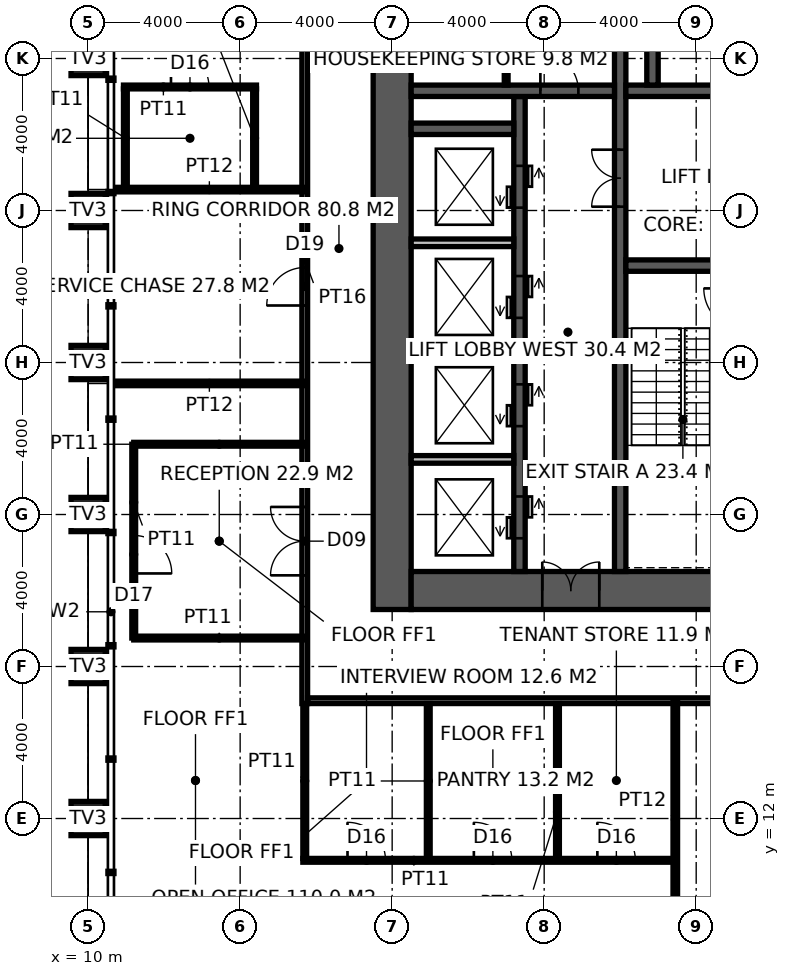
"""IFC4 building model, lengths in metres.
Left out: names, types, materials, properties, quantities, classifications, styles, units other than length and angle.
Written with IfcOpenShell. Run it as: python <this file> out.ifc"""

import sys

from ifc_helpers import new_model, si_unit, direction, frame, frame_2d, origin, origin_2d, place, context, subcontext, project, spatial, rectangle, hollow_rectangle, extrude, element, fill, save


model = new_model("IFC4")
c1 = context("Model", 3, precision=1e-05, world=origin(), true_north=direction((0.0, 1.0)))
c2 = subcontext(c1, "Body", "Model", "MODEL_VIEW")
j1 = project(units=[si_unit("LENGTHUNIT", "METRE"), si_unit("PLANEANGLEUNIT", "RADIAN")], contexts=[c1])
p1 = place(None, origin())
s1 = spatial("IfcSite", under=j1, at=p1, CompositionType="ELEMENT")
p2 = place(p1, origin())
s2 = spatial("IfcBuilding", under=s1, at=p2, CompositionType="ELEMENT")
p3 = place(p2, frame((0.0, 0.0, 238.2)))
s3 = spatial("IfcBuildingStorey", under=s2, at=p3, CompositionType="ELEMENT", Elevation=238.2)
for number, where, z_axis, x_axis in (
    (1, (10.0, 12.0, 0.0), (0.0, 0.0, 1.0), (1.0, 0.0, 0.0)),
    (2, (10.0, 16.0, 0.0), (0.0, 0.0, 1.0), (1.0, 0.0, 0.0)),
    (3, (10.0, 20.0, 0.0), (0.0, 0.0, 1.0), (1.0, 0.0, 0.0)),
    (4, (10.0, 24.0, 0.0), (0.0, 0.0, 1.0), (1.0, 0.0, 0.0)),
    (5, (10.0, 28.0, 0.0), (0.0, 0.0, 1.0), (1.0, 0.0, 0.0)),
    (6, (10.0, 32.0, 0.0), (0.0, 0.0, 1.0), (1.0, 0.0, 0.0)),
):
    element("IfcColumn", number, at=place(p3, frame(where, z_axis=z_axis, x_axis=x_axis)), inside=s3, PredefinedType="USERDEFINED", context=c2, shape_type="SweptSolid", body=[
        extrude(hollow_rectangle(XDim=0.9, YDim=0.9, WallThickness=0.08, at=origin_2d()), origin(), (0.0, 0.0, 1.0), 4.0),
    ])
p4 = place(p3, frame((18.0, 17.5, -0.15), z_axis=(0.0, 0.0, 1.0), x_axis=(0.0, 1.0, 0.0)))
e7 = element("IfcWall", 7, at=p4, inside=s3, PredefinedType="SHEAR", context=c2, shape_type="SweptSolid", body=[
    extrude(rectangle(XDim=19.0, YDim=1.0, at=frame_2d((9.5, 0.0))), origin(), (0.0, 0.0, 1.0), 4.0),
])
p5 = place(p3, frame((18.5, 18.0, -0.15), z_axis=(0.0, 0.0, 1.0), x_axis=(1.0, 0.0, 0.0)))
e8 = element("IfcWall", 8, at=p5, inside=s3, PredefinedType="SHEAR", context=c2, shape_type="SweptSolid", body=[
    extrude(rectangle(XDim=17.6, YDim=1.0, at=frame_2d((8.8, 0.0))), origin(), (0.0, 0.0, 1.0), 4.0),
])
p6 = place(p5, frame((3.45, 0.0, 0.15)))
e9 = element("IfcOpeningElement", 9, at=p6, cuts=e8, PredefinedType="OPENING", context=c2, shape_type="SweptSolid", body=[
    extrude(rectangle(XDim=1.5, YDim=2.4, at=frame_2d((0.75, 1.2))), frame((0.0, 0.51, 0.0), z_axis=(0.0, -1.0, 0.0), x_axis=(1.0, 0.0, 0.0)), (0.0, 0.0, 1.0), 1.02),
])
p7 = place(p3, frame((24.0, 18.5, -0.15), z_axis=(0.0, 0.0, 1.0), x_axis=(0.0, 1.0, 0.0)))
e10 = element("IfcWall", 10, at=p7, inside=s3, PredefinedType="SHEAR", context=c2, shape_type="SweptSolid", body=[
    extrude(rectangle(XDim=17.0, YDim=0.3, at=frame_2d((8.5, 0.0))), origin(), (0.0, 0.0, 1.0), 4.0),
])
p8 = place(p7, frame((9.6, 0.0, 0.15)))
e11 = element("IfcOpeningElement", 11, at=p8, cuts=e10, PredefinedType="OPENING", context=c2, shape_type="SweptSolid", body=[
    extrude(rectangle(XDim=1.5, YDim=2.4, at=frame_2d((0.75, 1.2))), frame((0.0, 0.16, 0.0), z_axis=(0.0, -1.0, 0.0), x_axis=(1.0, 0.0, 0.0)), (0.0, 0.0, 1.0), 0.32),
])
p9 = place(p3, frame((24.15, 26.55, -0.15), z_axis=(0.0, 0.0, 1.0), x_axis=(1.0, 0.0, 0.0)))
e12 = element("IfcWall", 12, at=p9, inside=s3, PredefinedType="SHEAR", context=c2, shape_type="SweptSolid", body=[
    extrude(rectangle(XDim=11.25, YDim=0.3, at=frame_2d((5.625, 0.0))), origin(), (0.0, 0.0, 1.0), 4.0),
])
p10 = place(p9, frame((9.2, 0.0, 0.15)))
e13 = element("IfcOpeningElement", 13, at=p10, cuts=e12, PredefinedType="OPENING", context=c2, shape_type="SweptSolid", body=[
    extrude(rectangle(XDim=1.1, YDim=2.2, at=frame_2d((0.55, 1.1))), frame((0.0, 0.16, 0.0), z_axis=(0.0, -1.0, 0.0), x_axis=(1.0, 0.0, 0.0)), (0.0, 0.0, 1.0), 0.32),
])
p11 = place(p9, frame((4.9, 0.0, 0.15)))
e14 = element("IfcOpeningElement", 14, at=p11, cuts=e12, PredefinedType="OPENING", context=c2, shape_type="SweptSolid", body=[
    extrude(rectangle(XDim=1.5, YDim=2.4, at=frame_2d((0.75, 1.2))), frame((0.0, 0.16, 0.0), z_axis=(0.0, -1.0, 0.0), x_axis=(1.0, 0.0, 0.0)), (0.0, 0.0, 1.0), 0.32),
])
p12 = place(p3, frame((24.15, 31.15, -0.15), z_axis=(0.0, 0.0, 1.0), x_axis=(1.0, 0.0, 0.0)))
e15 = element("IfcWall", 15, at=p12, inside=s3, PredefinedType="SHEAR", context=c2, shape_type="SweptSolid", body=[
    extrude(rectangle(XDim=11.25, YDim=0.3, at=frame_2d((5.625, 0.0))), origin(), (0.0, 0.0, 1.0), 4.0),
])
p13 = place(p12, frame((3.15, 0.0, 0.15)))
e16 = element("IfcOpeningElement", 16, at=p13, cuts=e15, PredefinedType="OPENING", context=c2, shape_type="SweptSolid", body=[
    extrude(rectangle(XDim=1.0, YDim=2.2, at=frame_2d((0.5, 1.1))), frame((0.0, 0.16, 0.0), z_axis=(0.0, -1.0, 0.0), x_axis=(1.0, 0.0, 0.0)), (0.0, 0.0, 1.0), 0.32),
])
p14 = place(p12, frame((7.25, 0.0, 0.15)))
e17 = element("IfcOpeningElement", 17, at=p14, cuts=e15, PredefinedType="OPENING", context=c2, shape_type="SweptSolid", body=[
    extrude(rectangle(XDim=1.4, YDim=2.4, at=frame_2d((0.7, 1.2))), frame((0.0, 0.16, 0.0), z_axis=(0.0, -1.0, 0.0), x_axis=(1.0, 0.0, 0.0)), (0.0, 0.0, 1.0), 0.32),
])
p15 = place(p3, frame((21.35, 18.5, -0.15), z_axis=(0.0, 0.0, 1.0), x_axis=(0.0, 1.0, 0.0)))
e18 = element("IfcWall", 18, at=p15, inside=s3, PredefinedType="SHEAR", context=c2, shape_type="SweptSolid", body=[
    extrude(rectangle(XDim=12.5, YDim=0.3, at=frame_2d((6.25, 0.0))), origin(), (0.0, 0.0, 1.0), 4.0),
])
p16 = place(p15, frame((0.875, 0.0, 0.15)))
e19 = element("IfcOpeningElement", 19, at=p16, cuts=e18, PredefinedType="OPENING", context=c2, shape_type="SweptSolid", body=[
    extrude(rectangle(XDim=1.1, YDim=2.2, at=frame_2d((0.55, 1.1))), frame((0.0, 0.16, 0.0), z_axis=(0.0, -1.0, 0.0), x_axis=(1.0, 0.0, 0.0)), (0.0, 0.0, 1.0), 0.32),
])
p17 = place(p15, frame((3.825, 0.0, 0.15)))
e20 = element("IfcOpeningElement", 20, at=p17, cuts=e18, PredefinedType="OPENING", context=c2, shape_type="SweptSolid", body=[
    extrude(rectangle(XDim=1.1, YDim=2.2, at=frame_2d((0.55, 1.1))), frame((0.0, 0.16, 0.0), z_axis=(0.0, -1.0, 0.0), x_axis=(1.0, 0.0, 0.0)), (0.0, 0.0, 1.0), 0.32),
])
p18 = place(p15, frame((6.675, 0.0, 0.15)))
e21 = element("IfcOpeningElement", 21, at=p18, cuts=e18, PredefinedType="OPENING", context=c2, shape_type="SweptSolid", body=[
    extrude(rectangle(XDim=1.1, YDim=2.2, at=frame_2d((0.55, 1.1))), frame((0.0, 0.16, 0.0), z_axis=(0.0, -1.0, 0.0), x_axis=(1.0, 0.0, 0.0)), (0.0, 0.0, 1.0), 0.32),
])
p19 = place(p15, frame((9.575, 0.0, 0.15)))
e22 = element("IfcOpeningElement", 22, at=p19, cuts=e18, PredefinedType="OPENING", context=c2, shape_type="SweptSolid", body=[
    extrude(rectangle(XDim=1.1, YDim=2.2, at=frame_2d((0.55, 1.1))), frame((0.0, 0.16, 0.0), z_axis=(0.0, -1.0, 0.0), x_axis=(1.0, 0.0, 0.0)), (0.0, 0.0, 1.0), 0.32),
])
p20 = place(p3, frame((18.5, 31.15, -0.15), z_axis=(0.0, 0.0, 1.0), x_axis=(1.0, 0.0, 0.0)))
e23 = element("IfcWall", 23, at=p20, inside=s3, PredefinedType="SHEAR", context=c2, shape_type="SweptSolid", body=[
    extrude(rectangle(XDim=5.35, YDim=0.3, at=frame_2d((2.675, 0.0))), origin(), (0.0, 0.0, 1.0), 4.0),
])
p21 = place(p20, frame((3.4, 0.0, 0.15)))
e24 = element("IfcOpeningElement", 24, at=p21, cuts=e23, PredefinedType="OPENING", context=c2, shape_type="SweptSolid", body=[
    extrude(rectangle(XDim=1.0, YDim=2.2, at=frame_2d((0.5, 1.1))), frame((0.0, 0.16, 0.0), z_axis=(0.0, -1.0, 0.0), x_axis=(1.0, 0.0, 0.0)), (0.0, 0.0, 1.0), 0.32),
])
p22 = place(p3, frame((18.5, 30.15, -0.15), z_axis=(0.0, 0.0, 1.0), x_axis=(1.0, 0.0, 0.0)))
e25 = element("IfcWall", 25, at=p22, inside=s3, PredefinedType="SHEAR", context=c2, shape_type="SweptSolid", body=[
    extrude(rectangle(XDim=2.7, YDim=0.3, at=frame_2d((1.35, 0.0))), origin(), (0.0, 0.0, 1.0), 4.0),
])
p23 = place(p3, frame((24.85, 31.3, -0.15), z_axis=(0.0, 0.0, 1.0), x_axis=(0.0, 1.0, 0.0)))
e26 = element("IfcWall", 26, at=p23, inside=s3, PredefinedType="SHEAR", context=c2, shape_type="SweptSolid", body=[
    extrude(rectangle(XDim=4.2, YDim=0.3, at=frame_2d((2.1, 0.0))), origin(), (0.0, 0.0, 1.0), 4.0),
])
for number, where, z_axis, x_axis in (
    (27, (18.5, 21.45, -0.15), (0.0, 0.0, 1.0), (1.0, 0.0, 0.0)),
    (28, (18.5, 24.3, -0.15), (0.0, 0.0, 1.0), (1.0, 0.0, 0.0)),
    (29, (18.5, 27.15, -0.15), (0.0, 0.0, 1.0), (1.0, 0.0, 0.0)),
):
    element("IfcWall", number, at=place(p3, frame(where, z_axis=z_axis, x_axis=x_axis)), inside=s3, PredefinedType="SOLIDWALL", context=c2, shape_type="SweptSolid", body=[
        extrude(rectangle(XDim=2.7, YDim=0.2, at=frame_2d((1.35, 0.0))), origin(), (0.0, 0.0, 1.0), 4.0),
    ])
p24 = place(p3, frame((21.0, 31.3, 0.0), z_axis=(0.0, 0.0, 1.0), x_axis=(0.0, 1.0, 0.0)))
e30 = element("IfcWall", 30, at=p24, inside=s3, PredefinedType="PARTITIONING", context=c2, shape_type="SweptSolid", body=[
    extrude(rectangle(XDim=4.2, YDim=0.1, at=frame_2d((2.1, 0.0))), origin(), (0.0, 0.0, 1.0), 3.85),
])
p25 = place(p24, frame((1.55, 0.0, 0.0)))
e31 = element("IfcOpeningElement", 31, at=p25, cuts=e30, PredefinedType="OPENING", context=c2, shape_type="SweptSolid", body=[
    extrude(rectangle(XDim=1.0, YDim=2.2, at=frame_2d((0.5, 1.1))), frame((0.0, 0.06, 0.0), z_axis=(0.0, -1.0, 0.0), x_axis=(1.0, 0.0, 0.0)), (0.0, 0.0, 1.0), 0.12),
])
p26 = place(p3, frame((15.7, 15.025, 0.0), z_axis=(0.0, 0.0, 1.0), x_axis=(0.0, 1.0, 0.0)))
e32 = element("IfcWall", 32, at=p26, inside=s3, PredefinedType="PARTITIONING", context=c2, shape_type="SweptSolid", body=[
    extrude(rectangle(XDim=23.35, YDim=0.15, at=frame_2d((11.675, 0.0))), origin(), (0.0, 0.0, 1.0), 3.85),
])
p27 = place(p26, frame((3.374, 0.0, 0.0)))
e33 = element("IfcOpeningElement", 33, at=p27, cuts=e32, PredefinedType="OPENING", context=c2, shape_type="SweptSolid", body=[
    extrude(rectangle(XDim=1.8, YDim=2.4, at=frame_2d((0.9, 1.2))), frame((0.0, 0.085, 0.0), z_axis=(0.0, -1.0, 0.0), x_axis=(1.0, 0.0, 0.0)), (0.0, 0.0, 1.0), 0.17),
])
p28 = place(p26, frame((17.476, 0.0, 0.0)))
e34 = element("IfcOpeningElement", 34, at=p28, cuts=e32, PredefinedType="OPENING", context=c2, shape_type="SweptSolid", body=[
    extrude(rectangle(XDim=1.8, YDim=2.4, at=frame_2d((0.9, 1.2))), frame((0.0, 0.085, 0.0), z_axis=(0.0, -1.0, 0.0), x_axis=(1.0, 0.0, 0.0)), (0.0, 0.0, 1.0), 0.17),
])
p29 = place(p26, frame((10.475, 0.0, 0.0)))
e35 = element("IfcOpeningElement", 35, at=p29, cuts=e32, PredefinedType="OPENING", context=c2, shape_type="SweptSolid", body=[
    extrude(rectangle(XDim=1.0, YDim=2.2, at=frame_2d((0.5, 1.1))), frame((0.0, 0.085, 0.0), z_axis=(0.0, -1.0, 0.0), x_axis=(1.0, 0.0, 0.0)), (0.0, 0.0, 1.0), 0.17),
])
p30 = place(p3, frame((15.775, 15.1, 0.0), z_axis=(0.0, 0.0, 1.0), x_axis=(1.0, 0.0, 0.0)))
e36 = element("IfcWall", 36, at=p30, inside=s3, PredefinedType="PARTITIONING", context=c2, shape_type="SweptSolid", body=[
    extrude(rectangle(XDim=22.65, YDim=0.15, at=frame_2d((11.325, 0.0))), origin(), (0.0, 0.0, 1.0), 3.85),
])
p31 = place(p30, frame((11.725, 0.0, 0.0)))
e37 = element("IfcOpeningElement", 37, at=p31, cuts=e36, PredefinedType="OPENING", context=c2, shape_type="SweptSolid", body=[
    extrude(rectangle(XDim=1.0, YDim=2.2, at=frame_2d((0.5, 1.1))), frame((0.0, 0.085, 0.0), z_axis=(0.0, -1.0, 0.0), x_axis=(1.0, 0.0, 0.0)), (0.0, 0.0, 1.0), 0.17),
])
p32 = place(p3, frame((25.45, 4.68, 0.0), z_axis=(0.0, 0.0, 1.0), x_axis=(0.0, 1.0, 0.0)))
e38 = element("IfcWall", 38, at=p32, inside=s3, PredefinedType="PARTITIONING", context=c2, shape_type="SweptSolid", body=[
    extrude(rectangle(XDim=10.42, YDim=0.12, at=frame_2d((5.21, 0.0))), origin(), (0.0, 0.0, 1.0), 3.85),
])
for number, where, z_axis, x_axis in (
    (39, (10.68, 23.45, 0.0), (0.0, 0.0, 1.0), (1.0, 0.0, 0.0)),
    (40, (10.68, 28.55, 0.0), (0.0, 0.0, 1.0), (1.0, 0.0, 0.0)),
):
    element("IfcWall", number, at=place(p3, frame(where, z_axis=z_axis, x_axis=x_axis)), inside=s3, PredefinedType="PARTITIONING", context=c2, shape_type="SweptSolid", body=[
        extrude(rectangle(XDim=5.02, YDim=0.12, at=frame_2d((2.51, 0.0))), origin(), (0.0, 0.0, 1.0), 2.65),
    ])
p33 = place(p3, frame((15.65, 10.9, 0.0), z_axis=(0.0, 0.0, 1.0), x_axis=(1.0, 0.0, 0.0)))
e41 = element("IfcWall", 41, at=p33, inside=s3, PredefinedType="PARTITIONING", context=c2, shape_type="SweptSolid", body=[
    extrude(rectangle(XDim=9.739, YDim=0.1, at=frame_2d((4.87, 0.0))), origin(), (0.0, 0.0, 1.0), 3.85),
])
p34 = place(p33, frame((1.175, 0.0, 0.0)))
e42 = element("IfcOpeningElement", 42, at=p34, cuts=e41, PredefinedType="OPENING", context=c2, shape_type="SweptSolid", body=[
    extrude(rectangle(XDim=1.0, YDim=2.2, at=frame_2d((0.5, 1.1))), frame((0.0, 0.06, 0.0), z_axis=(0.0, -1.0, 0.0), x_axis=(1.0, 0.0, 0.0)), (0.0, 0.0, 1.0), 0.12),
])
p35 = place(p33, frame((4.5, 0.0, 0.0)))
e43 = element("IfcOpeningElement", 43, at=p35, cuts=e41, PredefinedType="OPENING", context=c2, shape_type="SweptSolid", body=[
    extrude(rectangle(XDim=1.0, YDim=2.2, at=frame_2d((0.5, 1.1))), frame((0.0, 0.06, 0.0), z_axis=(0.0, -1.0, 0.0), x_axis=(1.0, 0.0, 0.0)), (0.0, 0.0, 1.0), 0.12),
])
p36 = place(p33, frame((7.75, 0.0, 0.0)))
e44 = element("IfcOpeningElement", 44, at=p36, cuts=e41, PredefinedType="OPENING", context=c2, shape_type="SweptSolid", body=[
    extrude(rectangle(XDim=1.0, YDim=2.2, at=frame_2d((0.5, 1.1))), frame((0.0, 0.06, 0.0), z_axis=(0.0, -1.0, 0.0), x_axis=(1.0, 0.0, 0.0)), (0.0, 0.0, 1.0), 0.12),
])
p37 = place(p3, frame((10.93, 31.25, 0.0), z_axis=(0.0, 0.0, 1.0), x_axis=(1.0, 0.0, 0.0)))
e45 = element("IfcWall", 45, at=p37, inside=s3, PredefinedType="PARTITIONING", context=c2, shape_type="SweptSolid", body=[
    extrude(rectangle(XDim=3.5, YDim=0.1, at=frame_2d((1.75, 0.0))), origin(), (0.0, 0.0, 1.0), 3.85),
])
p38 = place(p37, frame((1.25, 0.0, 0.0)))
e46 = element("IfcOpeningElement", 46, at=p38, cuts=e45, PredefinedType="OPENING", context=c2, shape_type="SweptSolid", body=[
    extrude(rectangle(XDim=1.0, YDim=2.2, at=frame_2d((0.5, 1.1))), frame((0.0, 0.06, 0.0), z_axis=(0.0, -1.0, 0.0), x_axis=(1.0, 0.0, 0.0)), (0.0, 0.0, 1.0), 0.12),
])
for number, where, z_axis, x_axis in (
    (47, (10.98, 28.61, 0.0), (0.0, 0.0, 1.0), (0.0, 1.0, 0.0)),
    (48, (14.38, 28.61, 0.0), (0.0, 0.0, 1.0), (0.0, 1.0, 0.0)),
):
    element("IfcWall", number, at=place(p3, frame(where, z_axis=z_axis, x_axis=x_axis)), inside=s3, PredefinedType="PARTITIONING", context=c2, shape_type="SweptSolid", body=[
        extrude(rectangle(XDim=2.59, YDim=0.1, at=frame_2d((1.295, 0.0))), origin(), (0.0, 0.0, 1.0), 3.85),
    ])
for number, where, z_axis, x_axis in (
    (49, (15.7, 10.95, 0.0), (0.0, 0.0, 1.0), (0.0, 1.0, 0.0)),
    (50, (18.95, 10.95, 0.0), (0.0, 0.0, 1.0), (0.0, 1.0, 0.0)),
):
    element("IfcWall", number, at=place(p3, frame(where, z_axis=z_axis, x_axis=x_axis)), inside=s3, PredefinedType="PARTITIONING", context=c2, shape_type="SweptSolid", body=[
        extrude(rectangle(XDim=4.075, YDim=0.1, at=frame_2d((2.038, 0.0))), origin(), (0.0, 0.0, 1.0), 3.85),
    ])
p39 = place(p3, frame((22.35, 10.95, 0.0), z_axis=(0.0, 0.0, 1.0), x_axis=(0.0, 1.0, 0.0)))
e51 = element("IfcWall", 51, at=p39, inside=s3, PredefinedType="PARTITIONING", context=c2, shape_type="SweptSolid", body=[
    extrude(rectangle(XDim=4.075, YDim=0.1, at=frame_2d((2.038, 0.0))), origin(), (0.0, 0.0, 1.0), 2.95),
])
p40 = place(p3, frame((15.7, 21.849, 0.0), z_axis=(0.0, 0.0, 1.0), x_axis=(-1.0, 0.0, 0.0)))
e52 = element("IfcWall", 52, at=p40, inside=s3, PredefinedType="PARTITIONING", context=c2, shape_type="SweptSolid", body=[
    extrude(rectangle(XDim=4.5, YDim=0.1, at=frame_2d((2.25, 0.0))), origin(), (0.0, 0.0, 1.0), 3.85),
])
p41 = place(p3, frame((11.2, 21.849, 0.0), z_axis=(0.0, 0.0, 1.0), x_axis=(0.0, -1.0, 0.0)))
e53 = element("IfcWall", 53, at=p41, inside=s3, PredefinedType="PARTITIONING", context=c2, shape_type="SweptSolid", body=[
    extrude(rectangle(XDim=5.1, YDim=0.1, at=frame_2d((2.55, 0.0))), origin(), (0.0, 0.0, 1.0), 3.85),
])
p42 = place(p41, frame((2.4, 0.0, 0.0)))
e54 = element("IfcOpeningElement", 54, at=p42, cuts=e53, PredefinedType="OPENING", context=c2, shape_type="SweptSolid", body=[
    extrude(rectangle(XDim=1.0, YDim=2.2, at=frame_2d((0.5, 1.1))), frame((0.0, 0.06, 0.0), z_axis=(0.0, -1.0, 0.0), x_axis=(1.0, 0.0, 0.0)), (0.0, 0.0, 1.0), 0.12),
])
p43 = place(p3, frame((11.2, 16.749, 0.0), z_axis=(0.0, 0.0, 1.0), x_axis=(1.0, 0.0, 0.0)))
e55 = element("IfcWall", 55, at=p43, inside=s3, PredefinedType="PARTITIONING", context=c2, shape_type="SweptSolid", body=[
    extrude(rectangle(XDim=4.5, YDim=0.1, at=frame_2d((2.25, 0.0))), origin(), (0.0, 0.0, 1.0), 3.85),
])
p44 = place(p8, origin())
e56 = element("IfcDoor", 56, at=p44, inside=s3, OperationType="DOUBLE_DOOR_DOUBLE_SWING", PredefinedType="DOOR", context=c2, shape_type="SweptSolid", body=[
    extrude(rectangle(XDim=1.5, YDim=2.4, at=frame_2d((0.75, 1.2))), frame((0.0, 0.025, 0.0), z_axis=(0.0, -1.0, 0.0), x_axis=(1.0, 0.0, 0.0)), (0.0, 0.0, 1.0), 0.05),
])
fill(e11, e56)
p45 = place(p21, origin())
e57 = element("IfcDoor", 57, at=p45, inside=s3, OperationType="SINGLE_SWING_LEFT", PredefinedType="DOOR", context=c2, shape_type="SweptSolid", body=[
    extrude(rectangle(XDim=1.0, YDim=2.2, at=frame_2d((0.5, 1.1))), frame((0.0, 0.025, 0.0), z_axis=(0.0, -1.0, 0.0), x_axis=(1.0, 0.0, 0.0)), (0.0, 0.0, 1.0), 0.05),
])
fill(e24, e57)
p46 = place(p6, origin())
e58 = element("IfcDoor", 58, at=p46, inside=s3, OperationType="DOUBLE_DOOR_DOUBLE_SWING", PredefinedType="DOOR", context=c2, shape_type="SweptSolid", body=[
    extrude(rectangle(XDim=1.5, YDim=2.4, at=frame_2d((0.75, 1.2))), frame((0.0, 0.025, 0.0), z_axis=(0.0, -1.0, 0.0), x_axis=(1.0, 0.0, 0.0)), (0.0, 0.0, 1.0), 0.05),
])
fill(e9, e58)
p47 = place(p27, origin())
e59 = element("IfcDoor", 59, at=p47, inside=s3, OperationType="DOUBLE_DOOR_DOUBLE_SWING", PredefinedType="DOOR", context=c2, shape_type="SweptSolid", body=[
    extrude(rectangle(XDim=1.8, YDim=2.4, at=frame_2d((0.9, 1.2))), frame((0.0, 0.025, 0.0), z_axis=(0.0, -1.0, 0.0), x_axis=(1.0, 0.0, 0.0)), (0.0, 0.0, 1.0), 0.05),
])
fill(e33, e59)
p48 = place(p29, origin())
e60 = element("IfcDoor", 60, at=p48, inside=s3, OperationType="SINGLE_SWING_LEFT", PredefinedType="DOOR", context=c2, shape_type="SweptSolid", body=[
    extrude(rectangle(XDim=1.0, YDim=2.2, at=frame_2d((0.5, 1.1))), frame((0.0, 0.025, 0.0), z_axis=(0.0, -1.0, 0.0), x_axis=(1.0, 0.0, 0.0)), (0.0, 0.0, 1.0), 0.05),
])
fill(e35, e60)
p49 = place(p34, origin())
e61 = element("IfcDoor", 61, at=p49, inside=s3, OperationType="SINGLE_SWING_LEFT", PredefinedType="DOOR", context=c2, shape_type="SweptSolid", body=[
    extrude(rectangle(XDim=1.0, YDim=2.2, at=frame_2d((0.5, 1.1))), frame((0.0, 0.025, 0.0), z_axis=(0.0, -1.0, 0.0), x_axis=(1.0, 0.0, 0.0)), (0.0, 0.0, 1.0), 0.05),
])
fill(e42, e61)
p50 = place(p35, origin())
e62 = element("IfcDoor", 62, at=p50, inside=s3, OperationType="SINGLE_SWING_LEFT", PredefinedType="DOOR", context=c2, shape_type="SweptSolid", body=[
    extrude(rectangle(XDim=1.0, YDim=2.2, at=frame_2d((0.5, 1.1))), frame((0.0, 0.025, 0.0), z_axis=(0.0, -1.0, 0.0), x_axis=(1.0, 0.0, 0.0)), (0.0, 0.0, 1.0), 0.05),
])
fill(e43, e62)
p51 = place(p36, origin())
e63 = element("IfcDoor", 63, at=p51, inside=s3, OperationType="SINGLE_SWING_LEFT", PredefinedType="DOOR", context=c2, shape_type="SweptSolid", body=[
    extrude(rectangle(XDim=1.0, YDim=2.2, at=frame_2d((0.5, 1.1))), frame((0.0, 0.025, 0.0), z_axis=(0.0, -1.0, 0.0), x_axis=(1.0, 0.0, 0.0)), (0.0, 0.0, 1.0), 0.05),
])
fill(e44, e63)
p52 = place(p38, origin())
e64 = element("IfcDoor", 64, at=p52, inside=s3, OperationType="SINGLE_SWING_LEFT", PredefinedType="DOOR", context=c2, shape_type="SweptSolid", body=[
    extrude(rectangle(XDim=1.0, YDim=2.2, at=frame_2d((0.5, 1.1))), frame((0.0, 0.025, 0.0), z_axis=(0.0, -1.0, 0.0), x_axis=(1.0, 0.0, 0.0)), (0.0, 0.0, 1.0), 0.05),
])
fill(e46, e64)
p53 = place(p42, origin())
e65 = element("IfcDoor", 65, at=p53, inside=s3, OperationType="SINGLE_SWING_RIGHT", PredefinedType="DOOR", context=c2, shape_type="SweptSolid", body=[
    extrude(rectangle(XDim=1.0, YDim=2.2, at=frame_2d((0.5, 1.1))), frame((0.0, 0.025, 0.0), z_axis=(0.0, -1.0, 0.0), x_axis=(1.0, 0.0, 0.0)), (0.0, 0.0, 1.0), 0.05),
])
fill(e54, e65)
p54 = place(p16, origin())
e66 = element("IfcDoor", 66, at=p54, inside=s3, OperationType="DOUBLE_DOOR_SLIDING", PredefinedType="DOOR", context=c2, shape_type="SweptSolid", body=[
    extrude(rectangle(XDim=1.1, YDim=2.2, at=frame_2d((0.55, 1.1))), frame((0.0, 0.025, 0.0), z_axis=(0.0, -1.0, 0.0), x_axis=(1.0, 0.0, 0.0)), (0.0, 0.0, 1.0), 0.05),
])
fill(e19, e66)
p55 = place(p17, origin())
e67 = element("IfcDoor", 67, at=p55, inside=s3, OperationType="DOUBLE_DOOR_SLIDING", PredefinedType="DOOR", context=c2, shape_type="SweptSolid", body=[
    extrude(rectangle(XDim=1.1, YDim=2.2, at=frame_2d((0.55, 1.1))), frame((0.0, 0.025, 0.0), z_axis=(0.0, -1.0, 0.0), x_axis=(1.0, 0.0, 0.0)), (0.0, 0.0, 1.0), 0.05),
])
fill(e20, e67)
p56 = place(p18, origin())
e68 = element("IfcDoor", 68, at=p56, inside=s3, OperationType="DOUBLE_DOOR_SLIDING", PredefinedType="DOOR", context=c2, shape_type="SweptSolid", body=[
    extrude(rectangle(XDim=1.1, YDim=2.2, at=frame_2d((0.55, 1.1))), frame((0.0, 0.025, 0.0), z_axis=(0.0, -1.0, 0.0), x_axis=(1.0, 0.0, 0.0)), (0.0, 0.0, 1.0), 0.05),
])
fill(e21, e68)
p57 = place(p19, origin())
e69 = element("IfcDoor", 69, at=p57, inside=s3, OperationType="DOUBLE_DOOR_SLIDING", PredefinedType="DOOR", context=c2, shape_type="SweptSolid", body=[
    extrude(rectangle(XDim=1.1, YDim=2.2, at=frame_2d((0.55, 1.1))), frame((0.0, 0.025, 0.0), z_axis=(0.0, -1.0, 0.0), x_axis=(1.0, 0.0, 0.0)), (0.0, 0.0, 1.0), 0.05),
])
fill(e22, e69)
save(model, sys.argv[1])
